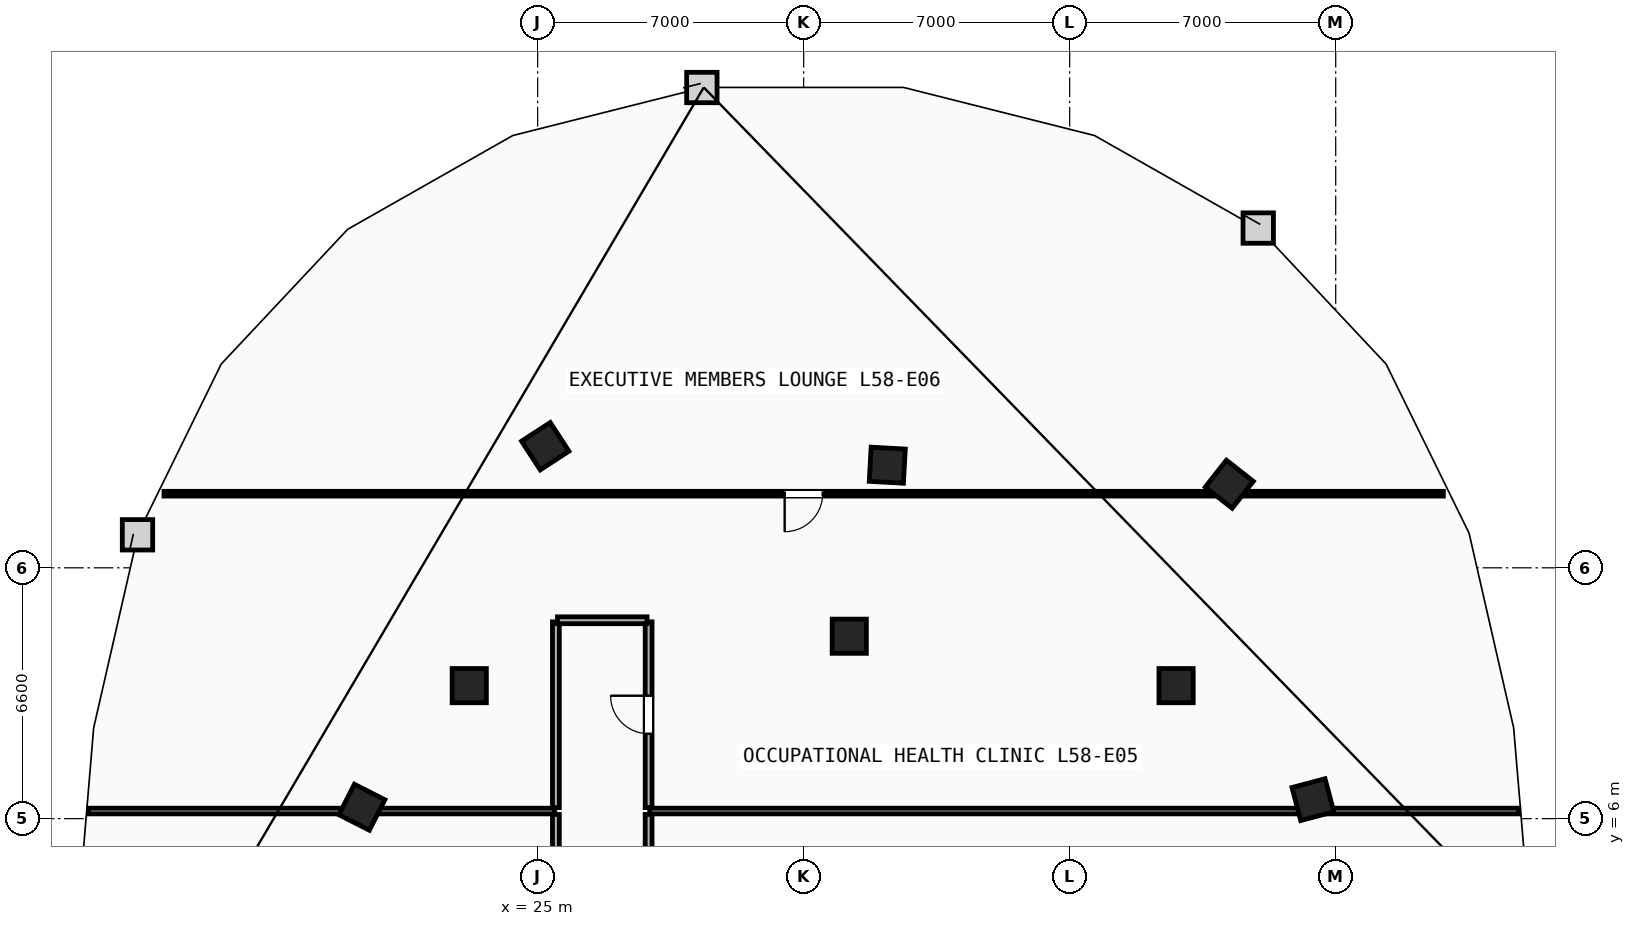
"""IFC4 building model, lengths in metres.
Left out: names, types, materials, properties, quantities, classifications, styles, units other than length and angle.
Written with IfcOpenShell. Run it as: python <this file> out.ifc"""

import sys

from ifc_helpers import new_model, si_unit, direction, frame, frame_2d, origin, origin_2d, place, context, subcontext, project, spatial, rectangle, extrude, element, fill, save


model = new_model("IFC4")
c1 = context("Model", 3, precision=1e-05, world=origin(), true_north=direction((0.0, 1.0)))
c2 = subcontext(c1, "Body", "Model", "MODEL_VIEW")
j1 = project(units=[si_unit("LENGTHUNIT", "METRE"), si_unit("PLANEANGLEUNIT", "RADIAN")], contexts=[c1])
p1 = place(None, origin())
s1 = spatial("IfcSite", under=j1, at=p1, CompositionType="ELEMENT")
p2 = place(p1, origin())
s2 = spatial("IfcBuilding", under=s1, at=p2, CompositionType="ELEMENT")
p3 = place(p2, frame((0.0, 0.0, 220.6)))
s3 = spatial("IfcBuildingStorey", under=s2, at=p3, CompositionType="ELEMENT", Elevation=220.6)
for number, where, z_axis, x_axis in (
    (1, (41.8, 9.5, 0.0), (0.0, 0.0, 1.0), (1.0, 0.0, 0.0)),
    (2, (33.2, 10.8, 0.0), (0.0, 0.0, 1.0), (1.0, 0.0, 0.0)),
    (3, (23.2, 9.5, 0.0), (0.0, 0.0, 1.0), (1.0, 0.0, 0.0)),
    (4, (45.4, 6.5, 0.0), (0.0, 0.0, 1.0), (-0.256, 0.967, 0.0)),
    (5, (43.2, 14.8, 0.0), (0.0, 0.0, 1.0), (-0.786, 0.618, 0.0)),
    (6, (34.2, 15.3, 0.0), (0.0, 0.0, 1.0), (-0.998, 0.055, 0.0)),
    (7, (25.2, 15.8, 0.0), (0.0, 0.0, 1.0), (-0.838, -0.546, 0.0)),
    (8, (20.375, 6.3, 0.0), (0.0, 0.0, 1.0), (-0.453, -0.892, 0.0)),
):
    element("IfcColumn", number, at=place(p3, frame(where, z_axis=z_axis, x_axis=x_axis)), inside=s3, PredefinedType="COLUMN", context=c2, shape_type="SweptSolid", body=[
        extrude(rectangle(XDim=0.9, YDim=0.9, at=origin_2d()), origin(), (0.0, 0.0, 1.0), 3.6),
    ])
p4 = place(p3, frame((13.183, 6.2, 0.0), z_axis=(0.0, 0.0, 1.0), x_axis=(1.0, 0.0, 0.0)))
e9 = element("IfcWall", 9, at=p4, inside=s3, PredefinedType="PARTITIONING", context=c2, shape_type="SweptSolid", body=[
    extrude(rectangle(XDim=12.267, YDim=0.15, at=frame_2d((6.133, 0.0))), origin(), (0.0, 0.0, 1.0), 3.34),
])
p5 = place(p3, frame((27.95, 6.2, 0.0), z_axis=(0.0, 0.0, 1.0), x_axis=(1.0, 0.0, 0.0)))
e10 = element("IfcWall", 10, at=p5, inside=s3, PredefinedType="PARTITIONING", context=c2, shape_type="SweptSolid", body=[
    extrude(rectangle(XDim=22.867, YDim=0.15, at=frame_2d((11.434, 0.0))), origin(), (0.0, 0.0, 1.0), 3.34),
])
p6 = place(p3, frame((25.48, 6.11, 0.0), z_axis=(0.0, 0.0, 1.0), x_axis=(0.0, -1.0, 0.0)))
e11 = element("IfcWall", 11, at=p6, inside=s3, PredefinedType="PARTITIONING", context=c2, shape_type="SweptSolid", body=[
    extrude(rectangle(XDim=5.66, YDim=0.18, at=frame_2d((2.83, 0.0))), origin(), (0.0, 0.0, 1.0), 3.34),
])
p7 = place(p3, frame((27.92, 0.45, 0.0), z_axis=(0.0, 0.0, 1.0), x_axis=(0.0, 1.0, 0.0)))
e12 = element("IfcWall", 12, at=p7, inside=s3, PredefinedType="PARTITIONING", context=c2, shape_type="SweptSolid", body=[
    extrude(rectangle(XDim=5.66, YDim=0.18, at=frame_2d((2.83, 0.0))), origin(), (0.0, 0.0, 1.0), 3.34),
])
p8 = place(p7, frame((2.33, 0.0, 0.0)))
e13 = element("IfcOpeningElement", 13, at=p8, cuts=e12, PredefinedType="OPENING", context=c2, shape_type="SweptSolid", body=[
    extrude(rectangle(XDim=1.0, YDim=2.15, at=frame_2d((0.5, 1.075))), frame((0.0, 0.1, 0.0), z_axis=(0.0, -1.0, 0.0), x_axis=(1.0, 0.0, 0.0)), (0.0, 0.0, 1.0), 0.2),
])
p9 = place(p3, frame((27.92, 6.29, 0.0), z_axis=(0.0, 0.0, 1.0), x_axis=(0.0, 1.0, 0.0)))
e14 = element("IfcWall", 14, at=p9, inside=s3, PredefinedType="PARTITIONING", context=c2, shape_type="SweptSolid", body=[
    extrude(rectangle(XDim=4.888, YDim=0.18, at=frame_2d((2.444, 0.0))), origin(), (0.0, 0.0, 1.0), 3.34),
])
p10 = place(p9, frame((1.944, 0.0, 0.0)))
e15 = element("IfcOpeningElement", 15, at=p10, cuts=e14, PredefinedType="OPENING", context=c2, shape_type="SweptSolid", body=[
    extrude(rectangle(XDim=1.0, YDim=2.15, at=frame_2d((0.5, 1.075))), frame((0.0, 0.1, 0.0), z_axis=(0.0, -1.0, 0.0), x_axis=(1.0, 0.0, 0.0)), (0.0, 0.0, 1.0), 0.2),
])
p11 = place(p3, frame((25.48, 11.178, 0.0), z_axis=(0.0, 0.0, 1.0), x_axis=(0.0, -1.0, 0.0)))
e16 = element("IfcWall", 16, at=p11, inside=s3, PredefinedType="PARTITIONING", context=c2, shape_type="SweptSolid", body=[
    extrude(rectangle(XDim=4.888, YDim=0.18, at=frame_2d((2.444, 0.0))), origin(), (0.0, 0.0, 1.0), 3.34),
])
p12 = place(p3, frame((27.878, 11.22, 0.0), z_axis=(0.0, 0.0, 1.0), x_axis=(-1.0, 0.0, 0.0)))
e17 = element("IfcWall", 17, at=p12, inside=s3, PredefinedType="PARTITIONING", context=c2, shape_type="SweptSolid", body=[
    extrude(rectangle(XDim=2.357, YDim=0.18, at=frame_2d((1.178, 0.0))), origin(), (0.0, 0.0, 1.0), 3.34),
])
p13 = place(p3, frame((48.833, 14.55, 0.0), z_axis=(0.0, 0.0, 1.0), x_axis=(-1.0, 0.0, 0.0)))
e18 = element("IfcWall", 18, at=p13, inside=s3, PredefinedType="PARTITIONING", context=c2, shape_type="SweptSolid", body=[
    extrude(rectangle(XDim=33.666, YDim=0.125, at=frame_2d((16.833, 0.0))), origin(), (0.0, 0.0, 1.0), 3.34),
])
p14 = place(p13, frame((16.333, 0.0, 0.0)))
e19 = element("IfcOpeningElement", 19, at=p14, cuts=e18, PredefinedType="OPENING", context=c2, shape_type="SweptSolid", body=[
    extrude(rectangle(XDim=1.0, YDim=2.15, at=frame_2d((0.5, 1.075))), frame((0.0, 0.073, 0.0), z_axis=(0.0, -1.0, 0.0), x_axis=(1.0, 0.0, 0.0)), (0.0, 0.0, 1.0), 0.145),
])
p15 = place(p14, origin())
e20 = element("IfcDoor", 20, at=p15, inside=s3, OperationType="SINGLE_SWING_RIGHT", PredefinedType="DOOR", context=c2, shape_type="SweptSolid", body=[
    extrude(rectangle(XDim=1.0, YDim=2.15, at=frame_2d((0.5, 1.075))), frame((0.0, 0.025, 0.0), z_axis=(0.0, -1.0, 0.0), x_axis=(1.0, 0.0, 0.0)), (0.0, 0.0, 1.0), 0.05),
])
fill(e19, e20)
p16 = place(p10, origin())
e21 = element("IfcDoor", 21, at=p16, inside=s3, OperationType="SINGLE_SWING_RIGHT", PredefinedType="DOOR", context=c2, shape_type="SweptSolid", body=[
    extrude(rectangle(XDim=1.0, YDim=2.15, at=frame_2d((0.5, 1.075))), frame((0.0, 0.025, 0.0), z_axis=(0.0, -1.0, 0.0), x_axis=(1.0, 0.0, 0.0)), (0.0, 0.0, 1.0), 0.05),
])
fill(e15, e21)
save(model, sys.argv[1])
